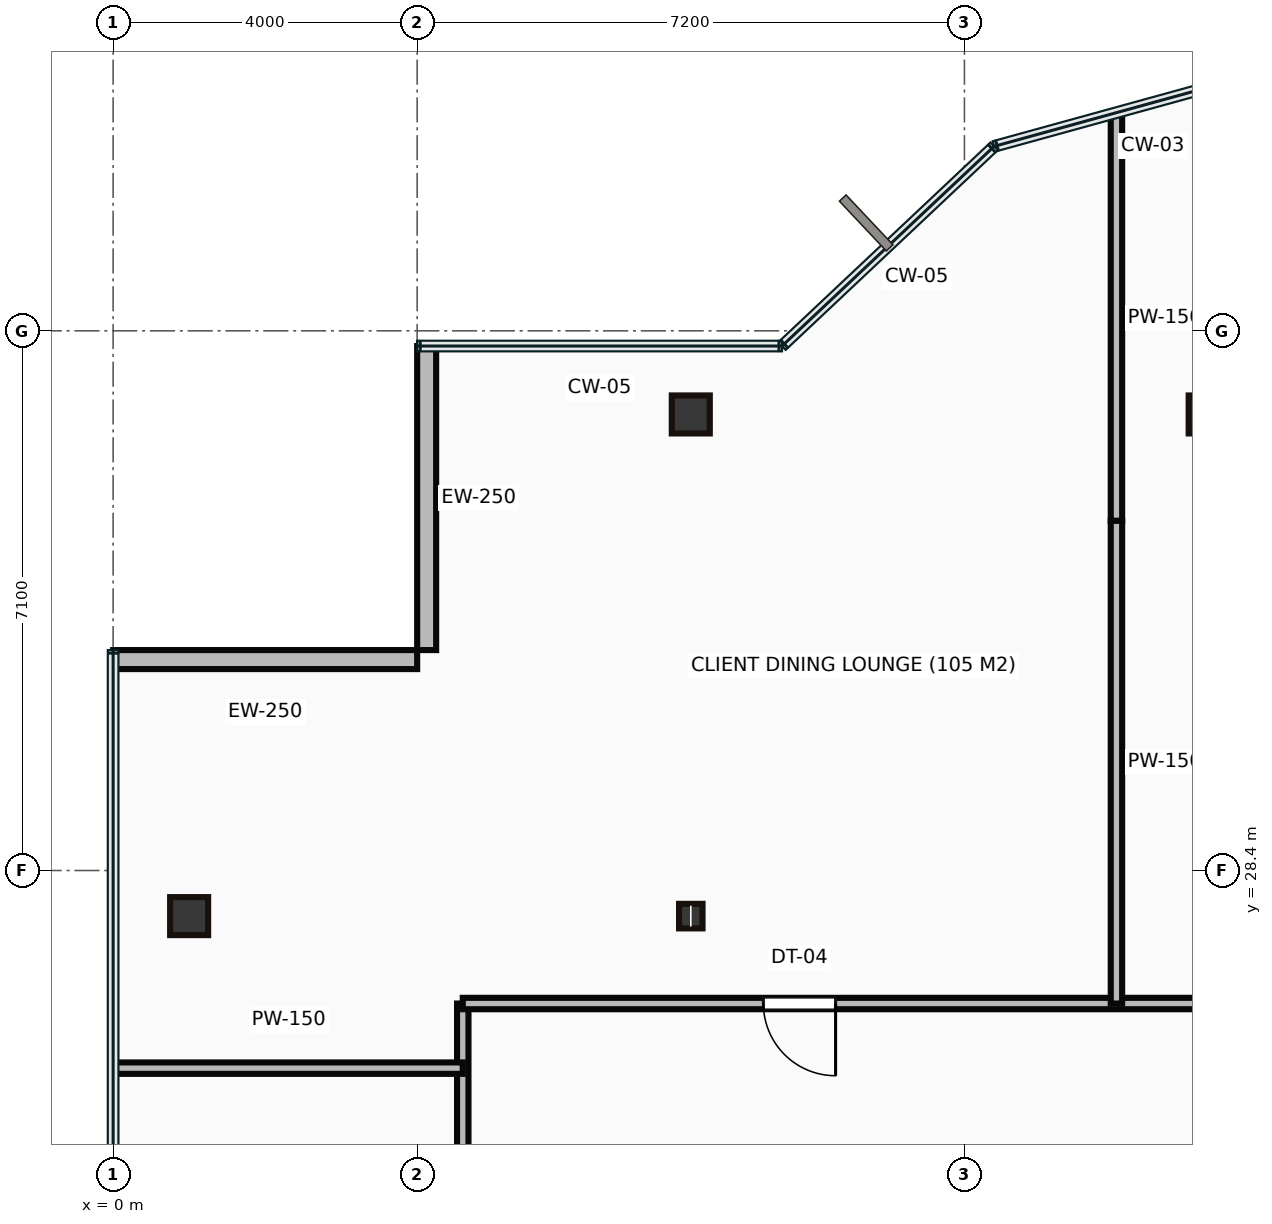
"""IFC4 building model, lengths in metres.
Left out: names, types, materials, properties, quantities, classifications, styles, units other than length and angle.
Written with IfcOpenShell. Run it as: python <this file> out.ifc"""

import sys

from ifc_helpers import new_model, si_unit, direction, frame, frame_2d, origin, origin_2d, place, context, subcontext, project, spatial, rectangle, hollow_rectangle, i_section, extrude, source, transform, mapped, element, fill, save


model = new_model("IFC4")
c1 = context("Model", 3, precision=1e-05, world=origin(), true_north=direction((0.0, 1.0)))
c2 = subcontext(c1, "Body", "Model", "MODEL_VIEW")
j1 = project(units=[si_unit("LENGTHUNIT", "METRE"), si_unit("PLANEANGLEUNIT", "RADIAN")], contexts=[c1])
p1 = place(None, origin())
s1 = spatial("IfcSite", under=j1, at=p1, CompositionType="ELEMENT")
p2 = place(p1, origin())
s2 = spatial("IfcBuilding", under=s1, at=p2, CompositionType="ELEMENT")
p3 = place(p2, frame((0.0, 0.0, 199.55)))
s3 = spatial("IfcBuildingStorey", under=s2, at=p3, CompositionType="ELEMENT", Elevation=199.55)
m1 = source(origin(), c2, "Body", "SweptSolid", [
    extrude(hollow_rectangle(XDim=0.5, YDim=0.5, WallThickness=0.022, at=origin_2d()), origin(), (0.0, 0.0, 1.0), 3.65),
])
p4 = place(p3, frame((1.0, 27.8, 0.0), z_axis=(0.0, 0.0, 1.0), x_axis=(1.0, 0.0, 0.0)))
e1 = element("IfcColumn", 1, at=p4, inside=s3, PredefinedType="COLUMN", context=c2, shape_type="MappedRepresentation", body=[
    mapped(m1, transform((0.0, 0.0, 0.0))),
])
m2 = source(origin(), c2, "Body", "SweptSolid", [
    extrude(i_section(OverallWidth=0.309, OverallDepth=0.323, WebThickness=0.014, FlangeThickness=0.023, at=origin_2d()), origin(), (0.0, 0.0, 1.0), 3.65),
])
p5 = place(p3, frame((7.6, 27.8, 0.0), z_axis=(0.0, 0.0, 1.0), x_axis=(1.0, 0.0, 0.0)))
e2 = element("IfcColumn", 2, at=p5, inside=s3, PredefinedType="COLUMN", context=c2, shape_type="MappedRepresentation", body=[
    mapped(m2, transform((0.0, 0.0, 0.0))),
])
for number, where, z_axis, x_axis in (
    (3, (7.6, 34.4, 0.0), (0.0, 0.0, 1.0), (1.0, 0.0, 0.0)),
    (4, (14.4, 34.4, 0.0), (0.0, 0.0, 1.0), (1.0, 0.0, 0.0)),
):
    element("IfcColumn", number, at=place(p3, frame(where, z_axis=z_axis, x_axis=x_axis)), inside=s3, PredefinedType="COLUMN", context=c2, shape_type="MappedRepresentation", body=[
        mapped(m1, transform((0.0, 0.0, 0.0))),
    ])
m3 = source(origin(), c2, "Body", "SweptSolid", [
    extrude(rectangle(XDim=4.0, YDim=0.25, at=frame_2d((2.0, 0.0))), origin(), (0.0, 0.0, 1.0), 3.4),
])
for number, where, z_axis, x_axis in (
    (5, (4.125, 35.3, 0.0), (0.0, 0.0, 1.0), (0.0, -1.0, 0.0)),
    (6, (4.0, 31.175, 0.0), (0.0, 0.0, 1.0), (-1.0, 0.0, 0.0)),
):
    element("IfcWall", number, at=place(p3, frame(where, z_axis=z_axis, x_axis=x_axis)), inside=s3, PredefinedType="STANDARD", context=c2, shape_type="MappedRepresentation", body=[
        mapped(m3, transform((0.0, 0.0, 0.0))),
    ])
m4 = source(origin(), c2, "Body", "SweptSolid", [
    extrude(rectangle(XDim=2.05, YDim=0.15, at=frame_2d((1.025, 0.0))), origin(), (0.0, 0.0, 1.0), 3.4),
])
p6 = place(p3, frame((4.6, 24.6, 0.0), z_axis=(0.0, 0.0, 1.0), x_axis=(0.0, 1.0, 0.0)))
e7 = element("IfcWall", 7, at=p6, inside=s3, PredefinedType="PARTITIONING", context=c2, shape_type="MappedRepresentation", body=[
    mapped(m4, transform((0.0, 0.0, 0.0))),
])
m5 = source(origin(), c2, "Body", "SweptSolid", [
    extrude(rectangle(XDim=25.6, YDim=0.15, at=frame_2d((12.8, 0.0))), origin(), (0.0, 0.0, 1.0), 3.4),
])
p7 = place(p3, frame((4.6, 26.65, 0.0), z_axis=(0.0, 0.0, 1.0), x_axis=(1.0, 0.0, 0.0)))
e8 = element("IfcWall", 8, at=p7, inside=s3, PredefinedType="PARTITIONING", context=c2, shape_type="MappedRepresentation", body=[
    mapped(m5, transform((0.0, 0.0, 0.0))),
])
p8 = place(p7, frame((3.955, 0.0, 0.0)))
e9 = element("IfcOpeningElement", 9, at=p8, cuts=e8, PredefinedType="OPENING", context=c2, shape_type="SweptSolid", body=[
    extrude(rectangle(XDim=0.95, YDim=2.15, at=frame_2d((0.475, 1.075))), frame((0.0, 0.085, 0.0), z_axis=(0.0, -1.0, 0.0), x_axis=(1.0, 0.0, 0.0)), (0.0, 0.0, 1.0), 0.17),
])
p9 = place(p7, frame((13.61, 0.0, 0.0)))
e10 = element("IfcOpeningElement", 10, at=p9, cuts=e8, PredefinedType="OPENING", context=c2, shape_type="SweptSolid", body=[
    extrude(rectangle(XDim=0.95, YDim=2.15, at=frame_2d((0.475, 1.075))), frame((0.0, 0.085, 0.0), z_axis=(0.0, -1.0, 0.0), x_axis=(1.0, 0.0, 0.0)), (0.0, 0.0, 1.0), 0.17),
])
m6 = source(origin(), c2, "Body", "SweptSolid", [
    extrude(rectangle(XDim=4.58, YDim=0.15, at=frame_2d((2.29, 0.0))), origin(), (0.0, 0.0, 1.0), 3.4),
])
p10 = place(p3, frame((0.02, 25.8, 0.0), z_axis=(0.0, 0.0, 1.0), x_axis=(1.0, 0.0, 0.0)))
e11 = element("IfcWall", 11, at=p10, inside=s3, PredefinedType="PARTITIONING", context=c2, shape_type="MappedRepresentation", body=[
    mapped(m6, transform((0.0, 0.0, 0.0))),
])
m7 = source(origin(), c2, "Body", "SweptSolid", [
    extrude(rectangle(XDim=5.35, YDim=0.15, at=frame_2d((2.675, 0.0))), origin(), (0.0, 0.0, 1.0), 3.4),
])
p11 = place(p3, frame((13.2, 38.35, 0.0), z_axis=(0.0, 0.0, 1.0), x_axis=(0.0, -1.0, 0.0)))
e12 = element("IfcWall", 12, at=p11, inside=s3, PredefinedType="PARTITIONING", context=c2, shape_type="MappedRepresentation", body=[
    mapped(m7, transform((0.0, 0.0, 0.0))),
])
m8 = source(origin(), c2, "Body", "SweptSolid", [
    extrude(rectangle(XDim=6.35, YDim=0.15, at=frame_2d((3.175, 0.0))), origin(), (0.0, 0.0, 1.0), 3.4),
])
p12 = place(p3, frame((13.2, 33.0, 0.0), z_axis=(0.0, 0.0, 1.0), x_axis=(0.0, -1.0, 0.0)))
e13 = element("IfcWall", 13, at=p12, inside=s3, PredefinedType="PARTITIONING", context=c2, shape_type="MappedRepresentation", body=[
    mapped(m8, transform((0.0, 0.0, 0.0))),
])
m9 = source(origin(), c2, "Body", "SweptSolid", [
    extrude(rectangle(XDim=0.95, YDim=2.15, at=frame_2d((0.475, 1.075))), frame((0.0, 0.025, 0.0), z_axis=(0.0, -1.0, 0.0), x_axis=(1.0, 0.0, 0.0)), (0.0, 0.0, 1.0), 0.05),
])
p13 = place(p8, origin())
e14 = element("IfcDoor", 14, at=p13, inside=s3, OperationType="SINGLE_SWING_RIGHT", PredefinedType="DOOR", context=c2, shape_type="MappedRepresentation", body=[
    mapped(m9, transform((0.0, 0.0, 0.0))),
])
fill(e9, e14)
save(model, sys.argv[1])
